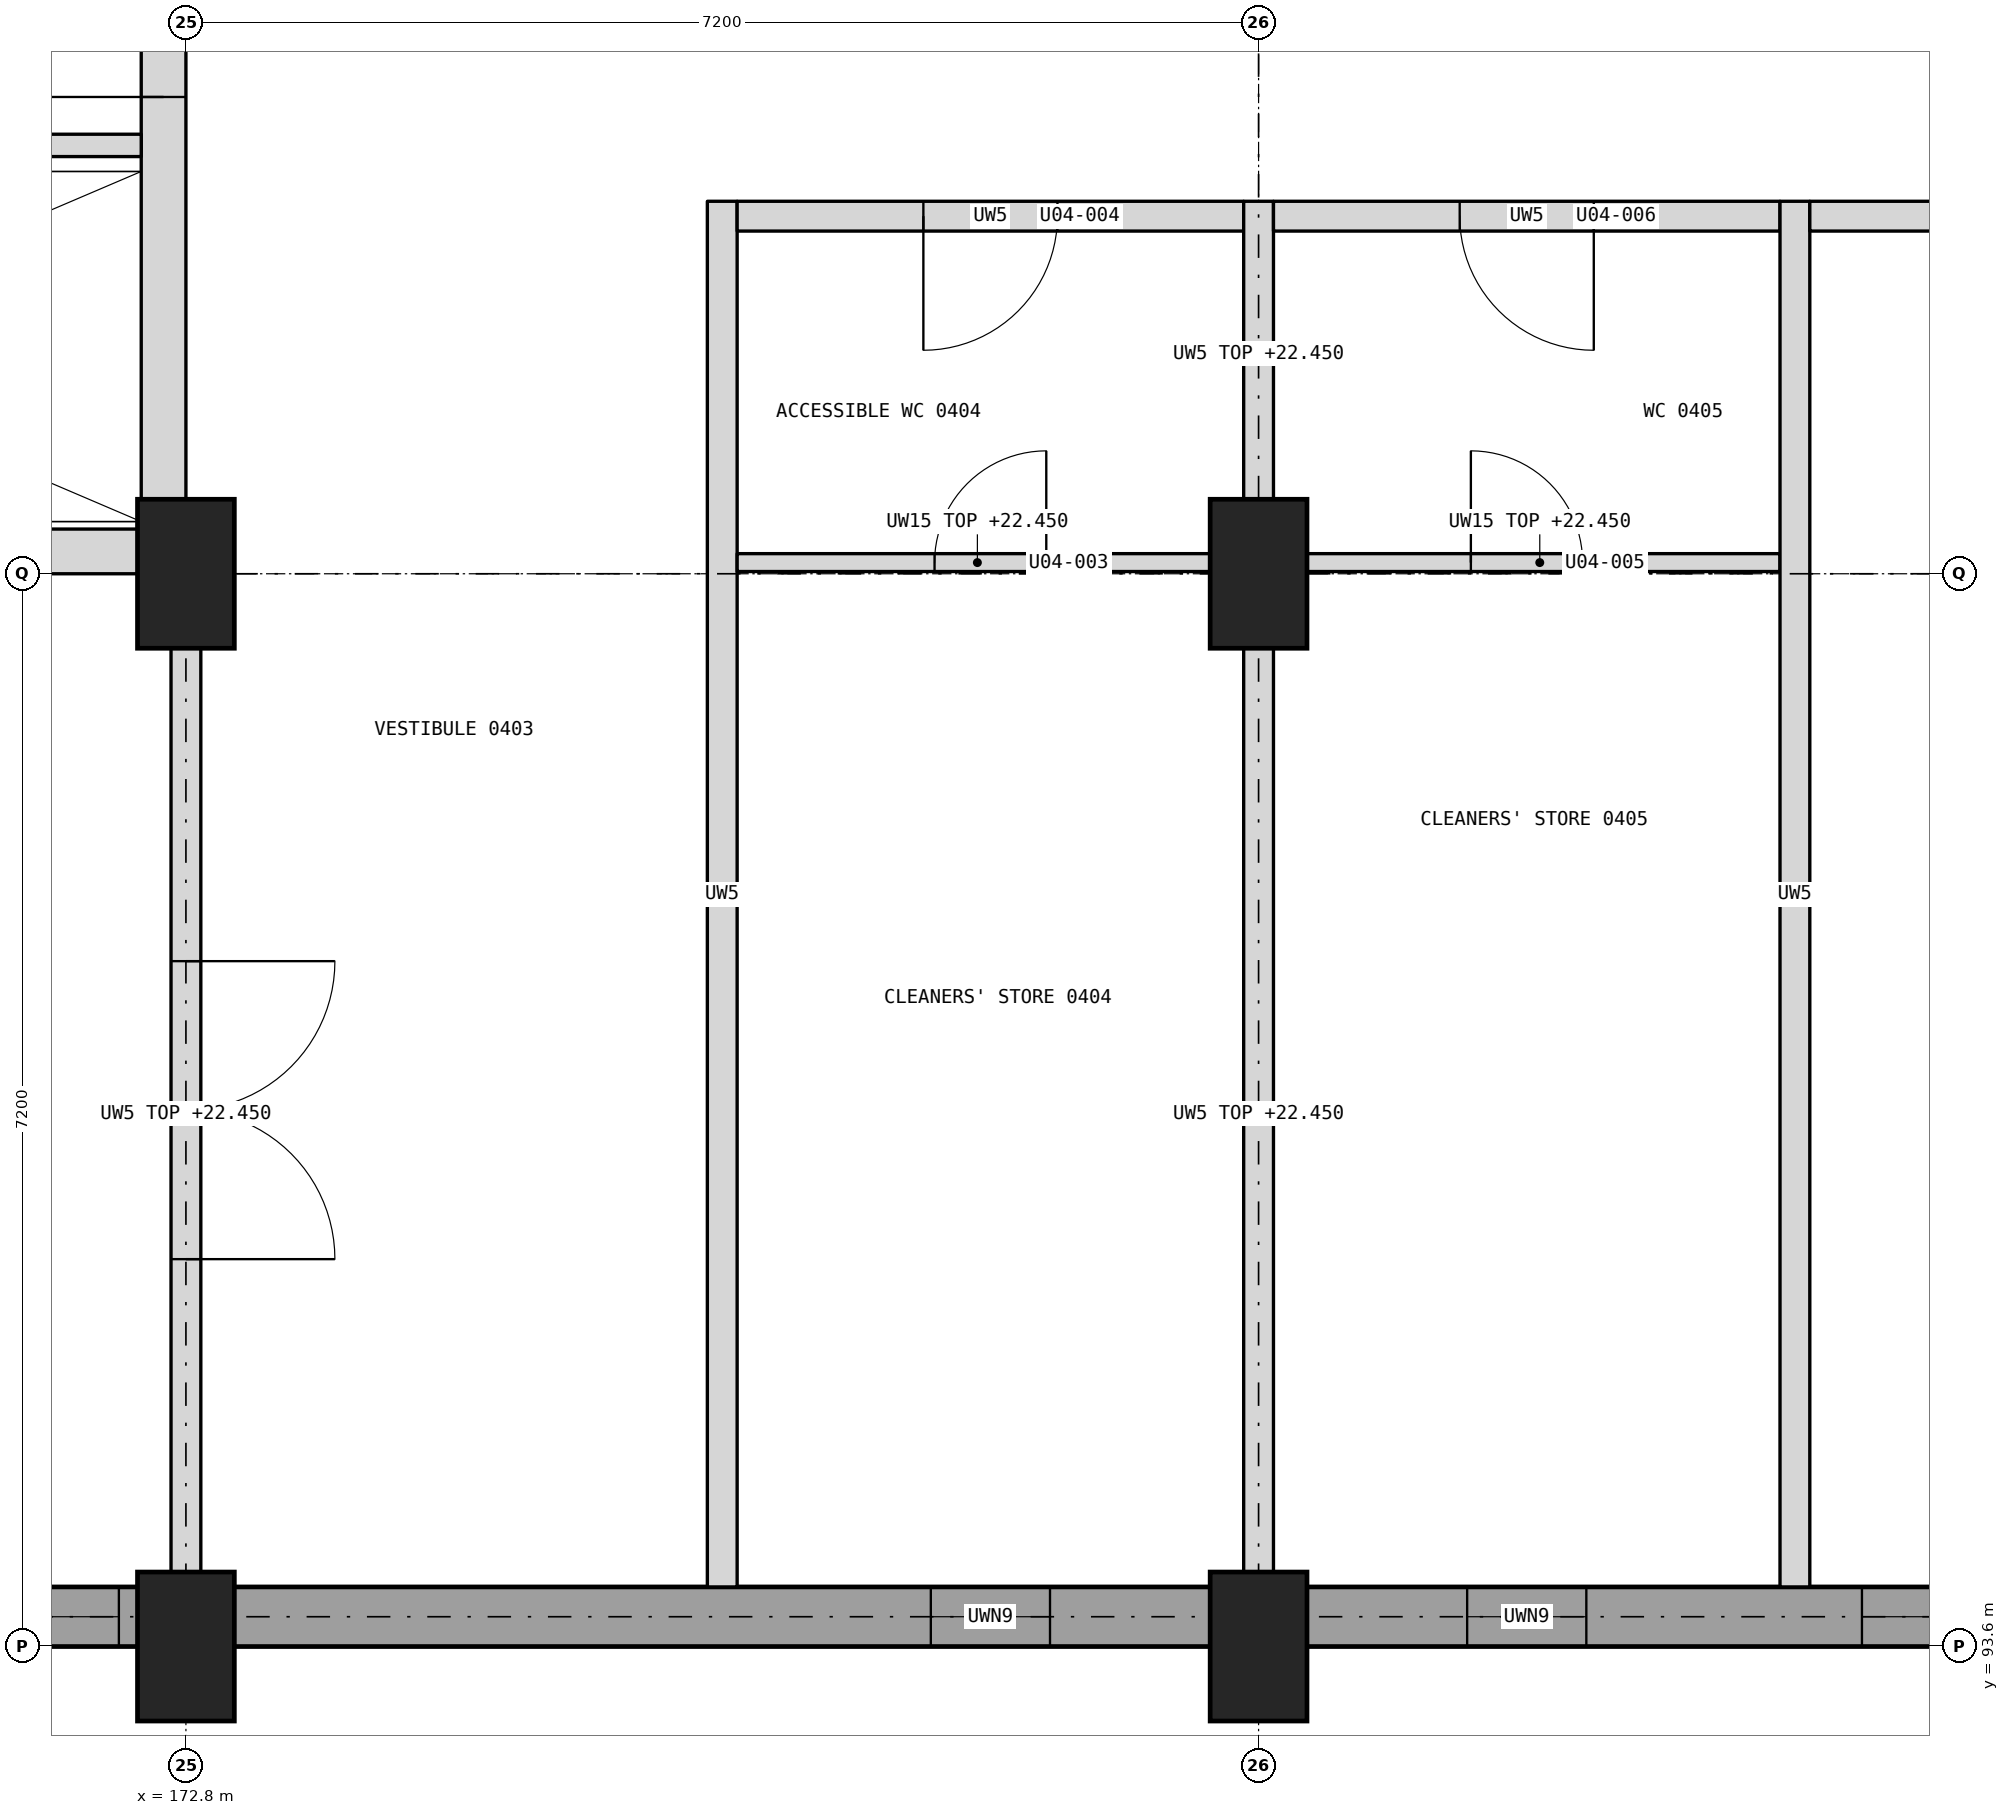
"""IFC4 building model, lengths in metres.
Left out: names, types, materials, properties, quantities, classifications, styles, units other than length and angle.
Written with IfcOpenShell. Run it as: python <this file> out.ifc"""

import sys

from ifc_helpers import new_model, si_unit, direction, frame, frame_2d, origin, origin_2d, place, context, subcontext, project, spatial, rectangle, extrude, element, fill, save


model = new_model("IFC4")
c1 = context("Model", 3, precision=1e-05, world=origin(), true_north=direction((0.0, 1.0)))
c2 = subcontext(c1, "Body", "Model", "MODEL_VIEW")
j1 = project(units=[si_unit("LENGTHUNIT", "METRE"), si_unit("PLANEANGLEUNIT", "RADIAN")], contexts=[c1])
p1 = place(None, origin())
s1 = spatial("IfcSite", under=j1, at=p1, CompositionType="ELEMENT")
p2 = place(p1, origin())
s2 = spatial("IfcBuilding", under=s1, at=p2, CompositionType="ELEMENT")
p3 = place(p2, frame((0.0, 0.0, 19.9)))
s3 = spatial("IfcBuildingStorey", under=s2, at=p3, CompositionType="ELEMENT", Elevation=19.9)
for number, where, z_axis, x_axis in (
    (1, (172.8, 93.6, 0.0), (0.0, 0.0, 1.0), (1.0, 0.0, 0.0)),
    (2, (172.8, 100.8, 0.0), (0.0, 0.0, 1.0), (1.0, 0.0, 0.0)),
    (3, (180.0, 93.6, 0.0), (0.0, 0.0, 1.0), (1.0, 0.0, 0.0)),
    (4, (180.0, 100.8, 0.0), (0.0, 0.0, 1.0), (1.0, 0.0, 0.0)),
):
    element("IfcColumn", number, at=place(p3, frame(where, z_axis=z_axis, x_axis=x_axis)), inside=s3, PredefinedType="COLUMN", context=c2, shape_type="SweptSolid", body=[
        extrude(rectangle(XDim=0.65, YDim=1.0, at=origin_2d()), origin(), (0.0, 0.0, 1.0), 3.4),
    ])
p4 = place(p3, frame((158.4, 100.95, 0.0), z_axis=(0.0, 0.0, 1.0), x_axis=(1.0, 0.0, 0.0)))
e5 = element("IfcWall", 5, at=p4, inside=s3, PredefinedType="SHEAR", context=c2, shape_type="SweptSolid", body=[
    extrude(rectangle(XDim=14.4, YDim=0.3, at=frame_2d((7.2, 0.0))), origin(), (0.0, 0.0, 1.0), 3.4),
])
p5 = place(p3, frame((172.65, 101.1, 0.0), z_axis=(0.0, 0.0, 1.0), x_axis=(0.0, 1.0, 0.0)))
e6 = element("IfcWall", 6, at=p5, inside=s3, PredefinedType="SHEAR", context=c2, shape_type="SweptSolid", body=[
    extrude(rectangle(XDim=6.6, YDim=0.3, at=frame_2d((3.3, 0.0))), origin(), (0.0, 0.0, 1.0), 3.4),
])
p6 = place(p5, frame((2.9, 0.0, 0.0)))
e7 = element("IfcOpeningElement", 7, at=p6, cuts=e6, PredefinedType="OPENING", context=c2, shape_type="SweptSolid", body=[
    extrude(rectangle(XDim=1.2, YDim=2.1, at=frame_2d((0.6, 1.05))), frame((0.0, 0.16, 0.0), z_axis=(0.0, -1.0, 0.0), x_axis=(1.0, 0.0, 0.0)), (0.0, 0.0, 1.0), 0.32),
])
p7 = place(p3, frame((165.75, 103.675, 0.0), z_axis=(0.0, 0.0, 1.0), x_axis=(1.0, 0.0, 0.0)))
e8 = element("IfcWall", 8, at=p7, inside=s3, PredefinedType="SHEAR", context=c2, shape_type="SweptSolid", body=[
    extrude(rectangle(XDim=6.75, YDim=0.15, at=frame_2d((3.375, 0.0))), origin(), (0.0, 0.0, 1.0), 3.4),
])
p8 = place(p7, frame((0.1, 0.0, 0.0)))
e9 = element("IfcOpeningElement", 9, at=p8, cuts=e8, PredefinedType="OPENING", context=c2, shape_type="SweptSolid", body=[
    extrude(rectangle(XDim=1.0, YDim=2.1, at=frame_2d((0.5, 1.05))), frame((0.0, 0.085, 0.0), z_axis=(0.0, -1.0, 0.0), x_axis=(1.0, 0.0, 0.0)), (0.0, 0.0, 1.0), 0.17),
])
p9 = place(p3, frame((165.6, 93.8, 0.0), z_axis=(0.0, 0.0, 1.0), x_axis=(1.0, 0.0, 0.0)))
e10 = element("IfcWall", 10, at=p9, inside=s3, PredefinedType="SOLIDWALL", context=c2, shape_type="SweptSolid", body=[
    extrude(rectangle(XDim=7.2, YDim=0.4, at=frame_2d((3.6, 0.0))), origin(), (0.0, 0.0, 1.0), 2.6),
])
p10 = place(p9, frame((0.45, 0.0, 0.9)))
e11 = element("IfcOpeningElement", 11, at=p10, cuts=e10, PredefinedType="OPENING", context=c2, shape_type="SweptSolid", body=[
    extrude(rectangle(XDim=2.7, YDim=1.5, at=frame_2d((1.35, 0.75))), frame((0.0, 0.21, 0.0), z_axis=(0.0, -1.0, 0.0), x_axis=(1.0, 0.0, 0.0)), (0.0, 0.0, 1.0), 0.42),
])
p11 = place(p9, frame((4.05, 0.0, 0.9)))
e12 = element("IfcOpeningElement", 12, at=p11, cuts=e10, PredefinedType="OPENING", context=c2, shape_type="SweptSolid", body=[
    extrude(rectangle(XDim=2.7, YDim=1.5, at=frame_2d((1.35, 0.75))), frame((0.0, 0.21, 0.0), z_axis=(0.0, -1.0, 0.0), x_axis=(1.0, 0.0, 0.0)), (0.0, 0.0, 1.0), 0.42),
])
p12 = place(p3, frame((172.8, 93.8, 0.0), z_axis=(0.0, 0.0, 1.0), x_axis=(1.0, 0.0, 0.0)))
e13 = element("IfcWall", 13, at=p12, inside=s3, PredefinedType="SOLIDWALL", context=c2, shape_type="SweptSolid", body=[
    extrude(rectangle(XDim=7.2, YDim=0.4, at=frame_2d((3.6, 0.0))), origin(), (0.0, 0.0, 1.0), 2.6),
])
p13 = place(p12, frame((5.0, 0.0, 0.9)))
e14 = element("IfcOpeningElement", 14, at=p13, cuts=e13, PredefinedType="OPENING", context=c2, shape_type="SweptSolid", body=[
    extrude(rectangle(XDim=0.8, YDim=1.5, at=frame_2d((0.4, 0.75))), frame((0.0, 0.21, 0.0), z_axis=(0.0, -1.0, 0.0), x_axis=(1.0, 0.0, 0.0)), (0.0, 0.0, 1.0), 0.42),
])
p14 = place(p3, frame((180.0, 93.8, 0.0), z_axis=(0.0, 0.0, 1.0), x_axis=(1.0, 0.0, 0.0)))
e15 = element("IfcWall", 15, at=p14, inside=s3, PredefinedType="SOLIDWALL", context=c2, shape_type="SweptSolid", body=[
    extrude(rectangle(XDim=7.2, YDim=0.4, at=frame_2d((3.6, 0.0))), origin(), (0.0, 0.0, 1.0), 2.6),
])
p15 = place(p14, frame((1.4, 0.0, 0.9)))
e16 = element("IfcOpeningElement", 16, at=p15, cuts=e15, PredefinedType="OPENING", context=c2, shape_type="SweptSolid", body=[
    extrude(rectangle(XDim=0.8, YDim=1.5, at=frame_2d((0.4, 0.75))), frame((0.0, 0.21, 0.0), z_axis=(0.0, -1.0, 0.0), x_axis=(1.0, 0.0, 0.0)), (0.0, 0.0, 1.0), 0.42),
])
p16 = place(p14, frame((4.05, 0.0, 0.9)))
e17 = element("IfcOpeningElement", 17, at=p16, cuts=e15, PredefinedType="OPENING", context=c2, shape_type="SweptSolid", body=[
    extrude(rectangle(XDim=2.7, YDim=1.5, at=frame_2d((1.35, 0.75))), frame((0.0, 0.21, 0.0), z_axis=(0.0, -1.0, 0.0), x_axis=(1.0, 0.0, 0.0)), (0.0, 0.0, 1.0), 0.42),
])
p17 = place(p3, frame((172.8, 94.0, 0.0), z_axis=(0.0, 0.0, 1.0), x_axis=(0.0, 1.0, 0.0)))
e18 = element("IfcWall", 18, at=p17, inside=s3, PredefinedType="PARTITIONING", context=c2, shape_type="SweptSolid", body=[
    extrude(rectangle(XDim=6.35, YDim=0.2, at=frame_2d((3.175, 0.0))), origin(), (0.0, 0.0, 1.0), 2.55),
])
p18 = place(p17, frame((2.2, 0.0, 0.0)))
e19 = element("IfcOpeningElement", 19, at=p18, cuts=e18, PredefinedType="OPENING", context=c2, shape_type="SweptSolid", body=[
    extrude(rectangle(XDim=2.0, YDim=2.1, at=frame_2d((1.0, 1.05))), frame((0.0, 0.11, 0.0), z_axis=(0.0, -1.0, 0.0), x_axis=(1.0, 0.0, 0.0)), (0.0, 0.0, 1.0), 0.22),
])
p19 = place(p3, frame((176.4, 94.0, 0.0), z_axis=(0.0, 0.0, 1.0), x_axis=(0.0, 1.0, 0.0)))
e20 = element("IfcWall", 20, at=p19, inside=s3, PredefinedType="PARTITIONING", context=c2, shape_type="SweptSolid", body=[
    extrude(rectangle(XDim=9.3, YDim=0.2, at=frame_2d((4.65, 0.0))), origin(), (0.0, 0.0, 1.0), 3.1),
])
p20 = place(p3, frame((176.5, 100.875, 0.0), z_axis=(0.0, 0.0, 1.0), x_axis=(1.0, 0.0, 0.0)))
e21 = element("IfcWall", 21, at=p20, inside=s3, PredefinedType="PARTITIONING", context=c2, shape_type="SweptSolid", body=[
    extrude(rectangle(XDim=3.225, YDim=0.12, at=frame_2d((1.613, 0.0))), origin(), (0.0, 0.0, 1.0), 2.55),
])
p21 = place(p20, frame((1.325, 0.0, 0.0)))
e22 = element("IfcOpeningElement", 22, at=p21, cuts=e21, PredefinedType="OPENING", context=c2, shape_type="SweptSolid", body=[
    extrude(rectangle(XDim=0.75, YDim=2.1, at=frame_2d((0.375, 1.05))), frame((0.0, 0.07, 0.0), z_axis=(0.0, -1.0, 0.0), x_axis=(1.0, 0.0, 0.0)), (0.0, 0.0, 1.0), 0.14),
])
p22 = place(p3, frame((176.5, 103.2, 0.0), z_axis=(0.0, 0.0, 1.0), x_axis=(1.0, 0.0, 0.0)))
e23 = element("IfcWall", 23, at=p22, inside=s3, PredefinedType="PARTITIONING", context=c2, shape_type="SweptSolid", body=[
    extrude(rectangle(XDim=3.4, YDim=0.2, at=frame_2d((1.7, 0.0))), origin(), (0.0, 0.0, 1.0), 3.1),
])
p23 = place(p22, frame((1.25, 0.0, 0.0)))
e24 = element("IfcOpeningElement", 24, at=p23, cuts=e23, PredefinedType="OPENING", context=c2, shape_type="SweptSolid", body=[
    extrude(rectangle(XDim=0.9, YDim=2.1, at=frame_2d((0.45, 1.05))), frame((0.0, 0.11, 0.0), z_axis=(0.0, -1.0, 0.0), x_axis=(1.0, 0.0, 0.0)), (0.0, 0.0, 1.0), 0.22),
])
p24 = place(p3, frame((180.0, 94.0, 0.0), z_axis=(0.0, 0.0, 1.0), x_axis=(0.0, 1.0, 0.0)))
e25 = element("IfcWall", 25, at=p24, inside=s3, PredefinedType="PARTITIONING", context=c2, shape_type="SweptSolid", body=[
    extrude(rectangle(XDim=6.35, YDim=0.2, at=frame_2d((3.175, 0.0))), origin(), (0.0, 0.0, 1.0), 2.55),
])
p25 = place(p3, frame((180.0, 101.25, 0.0), z_axis=(0.0, 0.0, 1.0), x_axis=(0.0, 1.0, 0.0)))
e26 = element("IfcWall", 26, at=p25, inside=s3, PredefinedType="PARTITIONING", context=c2, shape_type="SweptSolid", body=[
    extrude(rectangle(XDim=2.05, YDim=0.2, at=frame_2d((1.025, 0.0))), origin(), (0.0, 0.0, 1.0), 2.55),
])
p26 = place(p3, frame((180.275, 100.875, 0.0), z_axis=(0.0, 0.0, 1.0), x_axis=(1.0, 0.0, 0.0)))
e27 = element("IfcWall", 27, at=p26, inside=s3, PredefinedType="PARTITIONING", context=c2, shape_type="SweptSolid", body=[
    extrude(rectangle(XDim=3.225, YDim=0.12, at=frame_2d((1.613, 0.0))), origin(), (0.0, 0.0, 1.0), 2.55),
])
p27 = place(p26, frame((1.15, 0.0, 0.0)))
e28 = element("IfcOpeningElement", 28, at=p27, cuts=e27, PredefinedType="OPENING", context=c2, shape_type="SweptSolid", body=[
    extrude(rectangle(XDim=0.75, YDim=2.1, at=frame_2d((0.375, 1.05))), frame((0.0, 0.07, 0.0), z_axis=(0.0, -1.0, 0.0), x_axis=(1.0, 0.0, 0.0)), (0.0, 0.0, 1.0), 0.14),
])
p28 = place(p3, frame((180.1, 103.2, 0.0), z_axis=(0.0, 0.0, 1.0), x_axis=(1.0, 0.0, 0.0)))
e29 = element("IfcWall", 29, at=p28, inside=s3, PredefinedType="PARTITIONING", context=c2, shape_type="SweptSolid", body=[
    extrude(rectangle(XDim=3.4, YDim=0.2, at=frame_2d((1.7, 0.0))), origin(), (0.0, 0.0, 1.0), 3.1),
])
p29 = place(p28, frame((1.25, 0.0, 0.0)))
e30 = element("IfcOpeningElement", 30, at=p29, cuts=e29, PredefinedType="OPENING", context=c2, shape_type="SweptSolid", body=[
    extrude(rectangle(XDim=0.9, YDim=2.1, at=frame_2d((0.45, 1.05))), frame((0.0, 0.11, 0.0), z_axis=(0.0, -1.0, 0.0), x_axis=(1.0, 0.0, 0.0)), (0.0, 0.0, 1.0), 0.22),
])
p30 = place(p3, frame((183.6, 94.0, 0.0), z_axis=(0.0, 0.0, 1.0), x_axis=(0.0, 1.0, 0.0)))
e31 = element("IfcWall", 31, at=p30, inside=s3, PredefinedType="PARTITIONING", context=c2, shape_type="SweptSolid", body=[
    extrude(rectangle(XDim=9.3, YDim=0.2, at=frame_2d((4.65, 0.0))), origin(), (0.0, 0.0, 1.0), 3.1),
])
p31 = place(p3, frame((183.7, 103.2, 0.0), z_axis=(0.0, 0.0, 1.0), x_axis=(1.0, 0.0, 0.0)))
e32 = element("IfcWall", 32, at=p31, inside=s3, PredefinedType="PARTITIONING", context=c2, shape_type="SweptSolid", body=[
    extrude(rectangle(XDim=3.5, YDim=0.2, at=frame_2d((1.75, 0.0))), origin(), (0.0, 0.0, 1.0), 3.1),
])
p32 = place(p31, frame((0.9, 0.0, 0.0)))
e33 = element("IfcOpeningElement", 33, at=p32, cuts=e32, PredefinedType="OPENING", context=c2, shape_type="SweptSolid", body=[
    extrude(rectangle(XDim=2.0, YDim=2.1, at=frame_2d((1.0, 1.05))), frame((0.0, 0.11, 0.0), z_axis=(0.0, -1.0, 0.0), x_axis=(1.0, 0.0, 0.0)), (0.0, 0.0, 1.0), 0.22),
])
p33 = place(p11, origin())
e34 = element("IfcWindow", 34, at=p33, inside=s3, PartitioningType="TRIPLE_PANEL_VERTICAL", PredefinedType="WINDOW", context=c2, shape_type="SweptSolid", body=[
    extrude(rectangle(XDim=2.7, YDim=1.5, at=frame_2d((1.35, 0.75))), frame((0.0, 0.03, 0.0), z_axis=(0.0, -1.0, 0.0), x_axis=(1.0, 0.0, 0.0)), (0.0, 0.0, 1.0), 0.06),
])
fill(e12, e34)
p34 = place(p13, origin())
e35 = element("IfcWindow", 35, at=p34, inside=s3, PartitioningType="SINGLE_PANEL", PredefinedType="WINDOW", context=c2, shape_type="SweptSolid", body=[
    extrude(rectangle(XDim=0.8, YDim=1.5, at=frame_2d((0.4, 0.75))), frame((0.0, 0.03, 0.0), z_axis=(0.0, -1.0, 0.0), x_axis=(1.0, 0.0, 0.0)), (0.0, 0.0, 1.0), 0.06),
])
fill(e14, e35)
p35 = place(p15, origin())
e36 = element("IfcWindow", 36, at=p35, inside=s3, PartitioningType="SINGLE_PANEL", PredefinedType="WINDOW", context=c2, shape_type="SweptSolid", body=[
    extrude(rectangle(XDim=0.8, YDim=1.5, at=frame_2d((0.4, 0.75))), frame((0.0, 0.03, 0.0), z_axis=(0.0, -1.0, 0.0), x_axis=(1.0, 0.0, 0.0)), (0.0, 0.0, 1.0), 0.06),
])
fill(e16, e36)
p36 = place(p16, origin())
e37 = element("IfcWindow", 37, at=p36, inside=s3, PartitioningType="TRIPLE_PANEL_VERTICAL", PredefinedType="WINDOW", context=c2, shape_type="SweptSolid", body=[
    extrude(rectangle(XDim=2.7, YDim=1.5, at=frame_2d((1.35, 0.75))), frame((0.0, 0.03, 0.0), z_axis=(0.0, -1.0, 0.0), x_axis=(1.0, 0.0, 0.0)), (0.0, 0.0, 1.0), 0.06),
])
fill(e17, e37)
p37 = place(p18, frame((2.0, 0.0, 0.0), z_axis=(0.0, 0.0, 1.0), x_axis=(-1.0, 0.0, 0.0)))
e38 = element("IfcDoor", 38, at=p37, inside=s3, OperationType="DOUBLE_DOOR_SINGLE_SWING", PredefinedType="DOOR", context=c2, shape_type="SweptSolid", body=[
    extrude(rectangle(XDim=2.0, YDim=2.1, at=frame_2d((1.0, 1.05))), frame((0.0, 0.025, 0.0), z_axis=(0.0, -1.0, 0.0), x_axis=(1.0, 0.0, 0.0)), (0.0, 0.0, 1.0), 0.05),
])
fill(e19, e38)
p38 = place(p21, origin())
e39 = element("IfcDoor", 39, at=p38, inside=s3, OperationType="SINGLE_SWING_RIGHT", PredefinedType="DOOR", context=c2, shape_type="SweptSolid", body=[
    extrude(rectangle(XDim=0.75, YDim=2.1, at=frame_2d((0.375, 1.05))), frame((0.0, 0.025, 0.0), z_axis=(0.0, -1.0, 0.0), x_axis=(1.0, 0.0, 0.0)), (0.0, 0.0, 1.0), 0.05),
])
fill(e22, e39)
p39 = place(p23, frame((0.9, 0.0, 0.0), z_axis=(0.0, 0.0, 1.0), x_axis=(-1.0, 0.0, 0.0)))
e40 = element("IfcDoor", 40, at=p39, inside=s3, OperationType="SINGLE_SWING_RIGHT", PredefinedType="DOOR", context=c2, shape_type="SweptSolid", body=[
    extrude(rectangle(XDim=0.9, YDim=2.1, at=frame_2d((0.45, 1.05))), frame((0.0, 0.025, 0.0), z_axis=(0.0, -1.0, 0.0), x_axis=(1.0, 0.0, 0.0)), (0.0, 0.0, 1.0), 0.05),
])
fill(e24, e40)
p40 = place(p27, origin())
e41 = element("IfcDoor", 41, at=p40, inside=s3, OperationType="SINGLE_SWING_LEFT", PredefinedType="DOOR", context=c2, shape_type="SweptSolid", body=[
    extrude(rectangle(XDim=0.75, YDim=2.1, at=frame_2d((0.375, 1.05))), frame((0.0, 0.025, 0.0), z_axis=(0.0, -1.0, 0.0), x_axis=(1.0, 0.0, 0.0)), (0.0, 0.0, 1.0), 0.05),
])
fill(e28, e41)
p41 = place(p29, frame((0.9, 0.0, 0.0), z_axis=(0.0, 0.0, 1.0), x_axis=(-1.0, 0.0, 0.0)))
e42 = element("IfcDoor", 42, at=p41, inside=s3, OperationType="SINGLE_SWING_LEFT", PredefinedType="DOOR", context=c2, shape_type="SweptSolid", body=[
    extrude(rectangle(XDim=0.9, YDim=2.1, at=frame_2d((0.45, 1.05))), frame((0.0, 0.025, 0.0), z_axis=(0.0, -1.0, 0.0), x_axis=(1.0, 0.0, 0.0)), (0.0, 0.0, 1.0), 0.05),
])
fill(e30, e42)
p42 = place(p6, origin())
e43 = element("IfcDoor", 43, at=p42, inside=s3, OperationType="SINGLE_SWING_LEFT", PredefinedType="DOOR", context=c2, shape_type="SweptSolid", body=[
    extrude(rectangle(XDim=1.2, YDim=2.1, at=frame_2d((0.6, 1.05))), frame((0.0, 0.025, 0.0), z_axis=(0.0, -1.0, 0.0), x_axis=(1.0, 0.0, 0.0)), (0.0, 0.0, 1.0), 0.05),
])
fill(e7, e43)
save(model, sys.argv[1])
